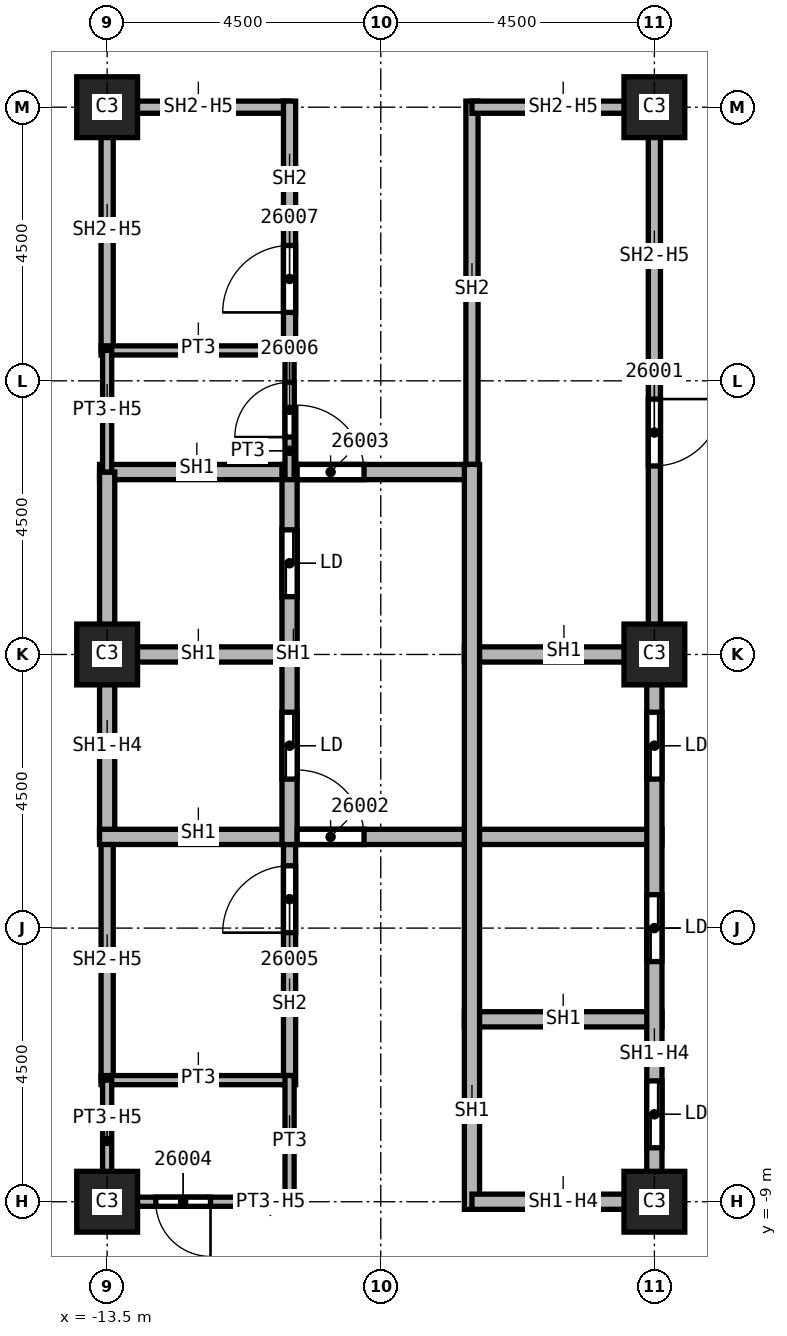
"""IFC4 building model, lengths in metres.
Left out: names, types, materials, properties, quantities, classifications, styles, units other than length and angle.
Written with IfcOpenShell. Run it as: python <this file> out.ifc"""

import sys

from ifc_helpers import new_model, si_unit, direction, frame, frame_2d, origin, origin_2d, place, context, subcontext, project, spatial, rectangle, extrude, element, fill, save


model = new_model("IFC4")
c1 = context("Model", 3, precision=1e-05, world=origin(), true_north=direction((0.0, 1.0)))
c2 = subcontext(c1, "Body", "Model", "MODEL_VIEW")
j1 = project(units=[si_unit("LENGTHUNIT", "METRE"), si_unit("PLANEANGLEUNIT", "RADIAN")], contexts=[c1])
p1 = place(None, origin())
s1 = spatial("IfcSite", under=j1, at=p1, CompositionType="ELEMENT")
p2 = place(p1, origin())
s2 = spatial("IfcBuilding", under=s1, at=p2, CompositionType="ELEMENT")
p3 = place(p2, frame((0.0, 0.0, 120.0)))
s3 = spatial("IfcBuildingStorey", under=s2, at=p3, CompositionType="ELEMENT", Elevation=120.0)
for number, where, z_axis, x_axis in (
    (1, (-4.5, 0.0, 0.0), (0.0, 0.0, 1.0), (1.0, 0.0, 0.0)),
    (2, (-4.5, 9.0, 0.0), (0.0, 0.0, 1.0), (1.0, 0.0, 0.0)),
    (3, (-4.5, -9.0, 0.0), (0.0, 0.0, 1.0), (1.0, 0.0, 0.0)),
    (4, (-13.5, 0.0, 0.0), (0.0, 0.0, 1.0), (1.0, 0.0, 0.0)),
    (5, (-13.5, 9.0, 0.0), (0.0, 0.0, 1.0), (1.0, 0.0, 0.0)),
    (6, (-13.5, -9.0, 0.0), (0.0, 0.0, 1.0), (1.0, 0.0, 0.0)),
):
    element("IfcColumn", number, at=place(p3, frame(where, z_axis=z_axis, x_axis=x_axis)), inside=s3, PredefinedType="COLUMN", context=c2, shape_type="SweptSolid", body=[
        extrude(rectangle(XDim=1.0, YDim=1.0, at=origin_2d()), origin(), (0.0, 0.0, 1.0), 5.7),
    ])
p4 = place(p3, frame((-13.5, -7.0, 0.0), z_axis=(0.0, 0.0, 1.0), x_axis=(0.0, 1.0, 0.0)))
e7 = element("IfcWall", 7, at=p4, inside=s3, PredefinedType="SOLIDWALL", context=c2, shape_type="SweptSolid", body=[
    extrude(rectangle(XDim=4.0, YDim=0.2, at=frame_2d((2.0, 0.0))), origin(), (0.0, 0.0, 1.0), 4.938),
])
p5 = place(p3, frame((-13.5, 5.0, 0.0), z_axis=(0.0, 0.0, 1.0), x_axis=(0.0, 1.0, 0.0)))
e8 = element("IfcWall", 8, at=p5, inside=s3, PredefinedType="SOLIDWALL", context=c2, shape_type="SweptSolid", body=[
    extrude(rectangle(XDim=4.1, YDim=0.2, at=frame_2d((2.05, 0.0))), origin(), (0.0, 0.0, 1.0), 4.938),
])
p6 = place(p3, frame((-13.5, 9.0, 0.0), z_axis=(0.0, 0.0, 1.0), x_axis=(1.0, 0.0, 0.0)))
e9 = element("IfcWall", 9, at=p6, inside=s3, PredefinedType="SOLIDWALL", context=c2, shape_type="SweptSolid", body=[
    extrude(rectangle(XDim=3.0, YDim=0.2, at=frame_2d((1.5, 0.0))), origin(), (0.0, 0.0, 1.0), 4.938),
])
p7 = place(p3, frame((-10.5, -7.075, 0.0), z_axis=(0.0, 0.0, 1.0), x_axis=(0.0, 1.0, 0.0)))
e10 = element("IfcWall", 10, at=p7, inside=s3, PredefinedType="SOLIDWALL", context=c2, shape_type="SweptSolid", body=[
    extrude(rectangle(XDim=4.2, YDim=0.2, at=frame_2d((2.1, 0.0))), origin(), (0.0, 0.0, 1.0), 5.7),
])
p8 = place(p7, frame((2.5, 0.0, 0.0)))
e11 = element("IfcOpeningElement", 11, at=p8, cuts=e10, PredefinedType="OPENING", context=c2, shape_type="SweptSolid", body=[
    extrude(rectangle(XDim=1.1, YDim=2.1, at=frame_2d((0.55, 1.05))), frame((0.0, 0.1, 0.0), z_axis=(0.0, -1.0, 0.0), x_axis=(1.0, 0.0, 0.0)), (0.0, 0.0, 1.0), 0.2),
])
p9 = place(p3, frame((-10.5, 4.925, 0.0), z_axis=(0.0, 0.0, 1.0), x_axis=(0.0, 1.0, 0.0)))
e12 = element("IfcWall", 12, at=p9, inside=s3, PredefinedType="SOLIDWALL", context=c2, shape_type="SweptSolid", body=[
    extrude(rectangle(XDim=4.175, YDim=0.2, at=frame_2d((2.087, 0.0))), origin(), (0.0, 0.0, 1.0), 5.7),
])
p10 = place(p9, frame((0.7, 0.0, 0.0)))
e13 = element("IfcOpeningElement", 13, at=p10, cuts=e12, PredefinedType="OPENING", context=c2, shape_type="SweptSolid", body=[
    extrude(rectangle(XDim=1.1, YDim=2.1, at=frame_2d((0.55, 1.05))), frame((0.0, 0.1, 0.0), z_axis=(0.0, -1.0, 0.0), x_axis=(1.0, 0.0, 0.0)), (0.0, 0.0, 1.0), 0.2),
])
p11 = place(p3, frame((-7.5, 2.875, 0.0), z_axis=(0.0, 0.0, 1.0), x_axis=(0.0, 1.0, 0.0)))
e14 = element("IfcWall", 14, at=p11, inside=s3, PredefinedType="SOLIDWALL", context=c2, shape_type="SweptSolid", body=[
    extrude(rectangle(XDim=6.225, YDim=0.2, at=frame_2d((3.113, 0.0))), origin(), (0.0, 0.0, 1.0), 5.7),
])
p12 = place(p3, frame((-7.5, 9.0, 0.0), z_axis=(0.0, 0.0, 1.0), x_axis=(1.0, 0.0, 0.0)))
e15 = element("IfcWall", 15, at=p12, inside=s3, PredefinedType="SOLIDWALL", context=c2, shape_type="SweptSolid", body=[
    extrude(rectangle(XDim=3.0, YDim=0.2, at=frame_2d((1.5, 0.0))), origin(), (0.0, 0.0, 1.0), 4.938),
])
p13 = place(p3, frame((-4.5, 9.1, 0.0), z_axis=(0.0, 0.0, 1.0), x_axis=(0.0, -1.0, 0.0)))
e16 = element("IfcWall", 16, at=p13, inside=s3, PredefinedType="SOLIDWALL", context=c2, shape_type="SweptSolid", body=[
    extrude(rectangle(XDim=9.1, YDim=0.2, at=frame_2d((4.55, 0.0))), origin(), (0.0, 0.0, 1.0), 4.938),
])
p14 = place(p13, frame((4.9, 0.0, 0.0)))
e17 = element("IfcOpeningElement", 17, at=p14, cuts=e16, PredefinedType="OPENING", context=c2, shape_type="SweptSolid", body=[
    extrude(rectangle(XDim=1.1, YDim=2.1, at=frame_2d((0.55, 1.05))), frame((0.0, 0.1, 0.0), z_axis=(0.0, -1.0, 0.0), x_axis=(1.0, 0.0, 0.0)), (0.0, 0.0, 1.0), 0.2),
])
p15 = place(p3, frame((-13.625, 0.0, 0.0), z_axis=(0.0, 0.0, 1.0), x_axis=(1.0, 0.0, 0.0)))
e18 = element("IfcWall", 18, at=p15, inside=s3, PredefinedType="SOLIDWALL", context=c2, shape_type="SweptSolid", body=[
    extrude(rectangle(XDim=3.125, YDim=0.25, at=frame_2d((1.562, 0.0))), origin(), (0.0, 0.0, 1.0), 5.7),
])
p16 = place(p3, frame((-13.625, 3.0, 0.0), z_axis=(0.0, 0.0, 1.0), x_axis=(1.0, 0.0, 0.0)))
e19 = element("IfcWall", 19, at=p16, inside=s3, PredefinedType="SOLIDWALL", context=c2, shape_type="SweptSolid", body=[
    extrude(rectangle(XDim=6.125, YDim=0.25, at=frame_2d((3.062, 0.0))), origin(), (0.0, 0.0, 1.0), 5.7),
])
p17 = place(p16, frame((3.25, 0.0, 0.0)))
e20 = element("IfcOpeningElement", 20, at=p17, cuts=e19, PredefinedType="OPENING", context=c2, shape_type="SweptSolid", body=[
    extrude(rectangle(XDim=1.1, YDim=2.1, at=frame_2d((0.55, 1.05))), frame((0.0, 0.125, 0.0), z_axis=(0.0, -1.0, 0.0), x_axis=(1.0, 0.0, 0.0)), (0.0, 0.0, 1.0), 0.25),
])
p18 = place(p3, frame((-13.5, -3.0, 0.0), z_axis=(0.0, 0.0, 1.0), x_axis=(0.0, 1.0, 0.0)))
e21 = element("IfcWall", 21, at=p18, inside=s3, PredefinedType="SOLIDWALL", context=c2, shape_type="SweptSolid", body=[
    extrude(rectangle(XDim=6.0, YDim=0.25, at=frame_2d((3.0, 0.0))), origin(), (0.0, 0.0, 1.0), 4.938),
])
p19 = place(p3, frame((-13.625, -3.0, 0.0), z_axis=(0.0, 0.0, 1.0), x_axis=(1.0, 0.0, 0.0)))
e22 = element("IfcWall", 22, at=p19, inside=s3, PredefinedType="SOLIDWALL", context=c2, shape_type="SweptSolid", body=[
    extrude(rectangle(XDim=9.25, YDim=0.25, at=frame_2d((4.625, 0.0))), origin(), (0.0, 0.0, 1.0), 5.7),
])
p20 = place(p19, frame((3.25, 0.0, 0.0)))
e23 = element("IfcOpeningElement", 23, at=p20, cuts=e22, PredefinedType="OPENING", context=c2, shape_type="SweptSolid", body=[
    extrude(rectangle(XDim=1.1, YDim=2.1, at=frame_2d((0.55, 1.05))), frame((0.0, 0.125, 0.0), z_axis=(0.0, -1.0, 0.0), x_axis=(1.0, 0.0, 0.0)), (0.0, 0.0, 1.0), 0.25),
])
p21 = place(p3, frame((-10.5, -3.125, 0.0), z_axis=(0.0, 0.0, 1.0), x_axis=(0.0, 1.0, 0.0)))
e24 = element("IfcWall", 24, at=p21, inside=s3, PredefinedType="SOLIDWALL", context=c2, shape_type="SweptSolid", body=[
    extrude(rectangle(XDim=6.25, YDim=0.25, at=frame_2d((3.125, 0.0))), origin(), (0.0, 0.0, 1.0), 5.7),
])
p22 = place(p21, frame((1.075, 0.0, 0.0)))
e25 = element("IfcOpeningElement", 25, at=p22, cuts=e24, PredefinedType="OPENING", context=c2, shape_type="SweptSolid", body=[
    extrude(rectangle(XDim=1.1, YDim=2.1, at=frame_2d((0.55, 1.05))), frame((0.0, 0.125, 0.0), z_axis=(0.0, -1.0, 0.0), x_axis=(1.0, 0.0, 0.0)), (0.0, 0.0, 1.0), 0.25),
])
p23 = place(p21, frame((4.075, 0.0, 0.0)))
e26 = element("IfcOpeningElement", 26, at=p23, cuts=e24, PredefinedType="OPENING", context=c2, shape_type="SweptSolid", body=[
    extrude(rectangle(XDim=1.1, YDim=2.1, at=frame_2d((0.55, 1.05))), frame((0.0, 0.125, 0.0), z_axis=(0.0, -1.0, 0.0), x_axis=(1.0, 0.0, 0.0)), (0.0, 0.0, 1.0), 0.25),
])
for number, where, z_axis, x_axis in (
    (27, (-7.625, -6.0, 0.0), (0.0, 0.0, 1.0), (1.0, 0.0, 0.0)),
    (28, (-7.625, 0.0, 0.0), (0.0, 0.0, 1.0), (1.0, 0.0, 0.0)),
):
    element("IfcWall", number, at=place(p3, frame(where, z_axis=z_axis, x_axis=x_axis)), inside=s3, PredefinedType="SOLIDWALL", context=c2, shape_type="SweptSolid", body=[
        extrude(rectangle(XDim=3.25, YDim=0.25, at=frame_2d((1.625, 0.0))), origin(), (0.0, 0.0, 1.0), 5.7),
    ])
p24 = place(p3, frame((-7.5, -9.125, 0.0), z_axis=(0.0, 0.0, 1.0), x_axis=(0.0, 1.0, 0.0)))
e29 = element("IfcWall", 29, at=p24, inside=s3, PredefinedType="SOLIDWALL", context=c2, shape_type="SweptSolid", body=[
    extrude(rectangle(XDim=12.25, YDim=0.25, at=frame_2d((6.125, 0.0))), origin(), (0.0, 0.0, 1.0), 5.7),
])
p25 = place(p3, frame((-4.5, -9.0, 0.0), z_axis=(0.0, 0.0, 1.0), x_axis=(-1.0, 0.0, 0.0)))
e30 = element("IfcWall", 30, at=p25, inside=s3, PredefinedType="SOLIDWALL", context=c2, shape_type="SweptSolid", body=[
    extrude(rectangle(XDim=3.0, YDim=0.25, at=frame_2d((1.5, 0.0))), origin(), (0.0, 0.0, 1.0), 4.938),
])
p26 = place(p3, frame((-4.5, 0.0, 0.0), z_axis=(0.0, 0.0, 1.0), x_axis=(0.0, -1.0, 0.0)))
e31 = element("IfcWall", 31, at=p26, inside=s3, PredefinedType="SOLIDWALL", context=c2, shape_type="SweptSolid", body=[
    extrude(rectangle(XDim=9.125, YDim=0.25, at=frame_2d((4.562, 0.0))), origin(), (0.0, 0.0, 1.0), 4.938),
])
p27 = place(p26, frame((7.012, 0.0, 0.0)))
e32 = element("IfcOpeningElement", 32, at=p27, cuts=e31, PredefinedType="OPENING", context=c2, shape_type="SweptSolid", body=[
    extrude(rectangle(XDim=1.1, YDim=2.1, at=frame_2d((0.55, 1.05))), frame((0.0, 0.125, 0.0), z_axis=(0.0, -1.0, 0.0), x_axis=(1.0, 0.0, 0.0)), (0.0, 0.0, 1.0), 0.25),
])
p28 = place(p26, frame((3.95, 0.0, 0.0)))
e33 = element("IfcOpeningElement", 33, at=p28, cuts=e31, PredefinedType="OPENING", context=c2, shape_type="SweptSolid", body=[
    extrude(rectangle(XDim=1.1, YDim=2.1, at=frame_2d((0.55, 1.05))), frame((0.0, 0.125, 0.0), z_axis=(0.0, -1.0, 0.0), x_axis=(1.0, 0.0, 0.0)), (0.0, 0.0, 1.0), 0.25),
])
p29 = place(p26, frame((0.95, 0.0, 0.0)))
e34 = element("IfcOpeningElement", 34, at=p29, cuts=e31, PredefinedType="OPENING", context=c2, shape_type="SweptSolid", body=[
    extrude(rectangle(XDim=1.1, YDim=2.1, at=frame_2d((0.55, 1.05))), frame((0.0, 0.125, 0.0), z_axis=(0.0, -1.0, 0.0), x_axis=(1.0, 0.0, 0.0)), (0.0, 0.0, 1.0), 0.25),
])
for number, where, z_axis, x_axis in (
    (35, (-13.6, -7.0, 0.0), (0.0, 0.0, 1.0), (1.0, 0.0, 0.0)),
    (36, (-13.6, 5.0, 0.0), (0.0, 0.0, 1.0), (1.0, 0.0, 0.0)),
):
    element("IfcWall", number, at=place(p3, frame(where, z_axis=z_axis, x_axis=x_axis)), inside=s3, PredefinedType="PARTITIONING", context=c2, shape_type="SweptSolid", body=[
        extrude(rectangle(XDim=3.1, YDim=0.15, at=frame_2d((1.55, 0.0))), origin(), (0.0, 0.0, 1.0), 5.7),
    ])
p30 = place(p3, frame((-13.5, -9.075, 0.0), z_axis=(0.0, 0.0, 1.0), x_axis=(0.0, 1.0, 0.0)))
e37 = element("IfcWall", 37, at=p30, inside=s3, PredefinedType="PARTITIONING", context=c2, shape_type="SweptSolid", body=[
    extrude(rectangle(XDim=2.075, YDim=0.15, at=frame_2d((1.038, 0.0))), origin(), (0.0, 0.0, 1.0), 4.938),
])
p31 = place(p3, frame((-13.5, 3.0, 0.0), z_axis=(0.0, 0.0, 1.0), x_axis=(0.0, 1.0, 0.0)))
e38 = element("IfcWall", 38, at=p31, inside=s3, PredefinedType="PARTITIONING", context=c2, shape_type="SweptSolid", body=[
    extrude(rectangle(XDim=2.0, YDim=0.15, at=frame_2d((1.0, 0.0))), origin(), (0.0, 0.0, 1.0), 4.938),
])
p32 = place(p3, frame((-10.5, -9.075, 0.0), z_axis=(0.0, 0.0, 1.0), x_axis=(0.0, 1.0, 0.0)))
e39 = element("IfcWall", 39, at=p32, inside=s3, PredefinedType="PARTITIONING", context=c2, shape_type="SweptSolid", body=[
    extrude(rectangle(XDim=2.15, YDim=0.15, at=frame_2d((1.075, 0.0))), origin(), (0.0, 0.0, 1.0), 5.7),
])
p33 = place(p3, frame((-10.5, -9.0, 0.0), z_axis=(0.0, 0.0, 1.0), x_axis=(-1.0, 0.0, 0.0)))
e40 = element("IfcWall", 40, at=p33, inside=s3, PredefinedType="PARTITIONING", context=c2, shape_type="SweptSolid", body=[
    extrude(rectangle(XDim=3.0, YDim=0.15, at=frame_2d((1.5, 0.0))), origin(), (0.0, 0.0, 1.0), 4.938),
])
p34 = place(p33, frame((1.3, 0.0, 0.0)))
e41 = element("IfcOpeningElement", 41, at=p34, cuts=e40, PredefinedType="OPENING", context=c2, shape_type="SweptSolid", body=[
    extrude(rectangle(XDim=0.9, YDim=2.1, at=frame_2d((0.45, 1.05))), frame((0.0, 0.075, 0.0), z_axis=(0.0, -1.0, 0.0), x_axis=(1.0, 0.0, 0.0)), (0.0, 0.0, 1.0), 0.15),
])
p35 = place(p3, frame((-10.5, 2.875, 0.0), z_axis=(0.0, 0.0, 1.0), x_axis=(0.0, 1.0, 0.0)))
e42 = element("IfcWall", 42, at=p35, inside=s3, PredefinedType="PARTITIONING", context=c2, shape_type="SweptSolid", body=[
    extrude(rectangle(XDim=2.2, YDim=0.15, at=frame_2d((1.1, 0.0))), origin(), (0.0, 0.0, 1.0), 5.7),
])
p36 = place(p35, frame((0.7, 0.0, 0.0)))
e43 = element("IfcOpeningElement", 43, at=p36, cuts=e42, PredefinedType="OPENING", context=c2, shape_type="SweptSolid", body=[
    extrude(rectangle(XDim=0.9, YDim=2.1, at=frame_2d((0.45, 1.05))), frame((0.0, 0.075, 0.0), z_axis=(0.0, -1.0, 0.0), x_axis=(1.0, 0.0, 0.0)), (0.0, 0.0, 1.0), 0.15),
])
p37 = place(p14, origin())
e44 = element("IfcDoor", 44, at=p37, inside=s3, OperationType="SINGLE_SWING_RIGHT", PredefinedType="DOOR", context=c2, shape_type="SweptSolid", body=[
    extrude(rectangle(XDim=1.1, YDim=2.1, at=frame_2d((0.55, 1.05))), frame((0.0, 0.025, 0.0), z_axis=(0.0, -1.0, 0.0), x_axis=(1.0, 0.0, 0.0)), (0.0, 0.0, 1.0), 0.05),
])
fill(e17, e44)
p38 = place(p20, origin())
e45 = element("IfcDoor", 45, at=p38, inside=s3, OperationType="SINGLE_SWING_LEFT", PredefinedType="DOOR", context=c2, shape_type="SweptSolid", body=[
    extrude(rectangle(XDim=1.1, YDim=2.1, at=frame_2d((0.55, 1.05))), frame((0.0, 0.025, 0.0), z_axis=(0.0, -1.0, 0.0), x_axis=(1.0, 0.0, 0.0)), (0.0, 0.0, 1.0), 0.05),
])
fill(e23, e45)
p39 = place(p17, origin())
e46 = element("IfcDoor", 46, at=p39, inside=s3, OperationType="SINGLE_SWING_RIGHT", PredefinedType="DOOR", context=c2, shape_type="SweptSolid", body=[
    extrude(rectangle(XDim=1.1, YDim=2.1, at=frame_2d((0.55, 1.05))), frame((0.0, 0.025, 0.0), z_axis=(0.0, -1.0, 0.0), x_axis=(1.0, 0.0, 0.0)), (0.0, 0.0, 1.0), 0.05),
])
fill(e20, e46)
p40 = place(p34, origin())
e47 = element("IfcDoor", 47, at=p40, inside=s3, OperationType="SINGLE_SWING_LEFT", PredefinedType="DOOR", context=c2, shape_type="SweptSolid", body=[
    extrude(rectangle(XDim=0.9, YDim=2.1, at=frame_2d((0.45, 1.05))), frame((0.0, 0.025, 0.0), z_axis=(0.0, -1.0, 0.0), x_axis=(1.0, 0.0, 0.0)), (0.0, 0.0, 1.0), 0.05),
])
fill(e41, e47)
p41 = place(p8, origin())
e48 = element("IfcDoor", 48, at=p41, inside=s3, OperationType="SINGLE_SWING_RIGHT", PredefinedType="DOOR", context=c2, shape_type="SweptSolid", body=[
    extrude(rectangle(XDim=1.1, YDim=2.1, at=frame_2d((0.55, 1.05))), frame((0.0, 0.025, 0.0), z_axis=(0.0, -1.0, 0.0), x_axis=(1.0, 0.0, 0.0)), (0.0, 0.0, 1.0), 0.05),
])
fill(e11, e48)
p42 = place(p36, origin())
e49 = element("IfcDoor", 49, at=p42, inside=s3, OperationType="SINGLE_SWING_LEFT", PredefinedType="DOOR", context=c2, shape_type="SweptSolid", body=[
    extrude(rectangle(XDim=0.9, YDim=2.1, at=frame_2d((0.45, 1.05))), frame((0.0, 0.025, 0.0), z_axis=(0.0, -1.0, 0.0), x_axis=(1.0, 0.0, 0.0)), (0.0, 0.0, 1.0), 0.05),
])
fill(e43, e49)
p43 = place(p10, origin())
e50 = element("IfcDoor", 50, at=p43, inside=s3, OperationType="SINGLE_SWING_RIGHT", PredefinedType="DOOR", context=c2, shape_type="SweptSolid", body=[
    extrude(rectangle(XDim=1.1, YDim=2.1, at=frame_2d((0.55, 1.05))), frame((0.0, 0.025, 0.0), z_axis=(0.0, -1.0, 0.0), x_axis=(1.0, 0.0, 0.0)), (0.0, 0.0, 1.0), 0.05),
])
fill(e13, e50)
p44 = place(p27, origin())
e51 = element("IfcDoor", 51, at=p44, inside=s3, OperationType="SLIDING_TO_LEFT", PredefinedType="DOOR", context=c2, shape_type="SweptSolid", body=[
    extrude(rectangle(XDim=1.1, YDim=2.1, at=frame_2d((0.55, 1.05))), frame((0.0, 0.025, 0.0), z_axis=(0.0, -1.0, 0.0), x_axis=(1.0, 0.0, 0.0)), (0.0, 0.0, 1.0), 0.05),
])
fill(e32, e51)
p45 = place(p28, origin())
e52 = element("IfcDoor", 52, at=p45, inside=s3, OperationType="SLIDING_TO_LEFT", PredefinedType="DOOR", context=c2, shape_type="SweptSolid", body=[
    extrude(rectangle(XDim=1.1, YDim=2.1, at=frame_2d((0.55, 1.05))), frame((0.0, 0.025, 0.0), z_axis=(0.0, -1.0, 0.0), x_axis=(1.0, 0.0, 0.0)), (0.0, 0.0, 1.0), 0.05),
])
fill(e33, e52)
p46 = place(p29, origin())
e53 = element("IfcDoor", 53, at=p46, inside=s3, OperationType="SLIDING_TO_LEFT", PredefinedType="DOOR", context=c2, shape_type="SweptSolid", body=[
    extrude(rectangle(XDim=1.1, YDim=2.1, at=frame_2d((0.55, 1.05))), frame((0.0, 0.025, 0.0), z_axis=(0.0, -1.0, 0.0), x_axis=(1.0, 0.0, 0.0)), (0.0, 0.0, 1.0), 0.05),
])
fill(e34, e53)
p47 = place(p22, origin())
e54 = element("IfcDoor", 54, at=p47, inside=s3, OperationType="SLIDING_TO_LEFT", PredefinedType="DOOR", context=c2, shape_type="SweptSolid", body=[
    extrude(rectangle(XDim=1.1, YDim=2.1, at=frame_2d((0.55, 1.05))), frame((0.0, 0.025, 0.0), z_axis=(0.0, -1.0, 0.0), x_axis=(1.0, 0.0, 0.0)), (0.0, 0.0, 1.0), 0.05),
])
fill(e25, e54)
p48 = place(p23, origin())
e55 = element("IfcDoor", 55, at=p48, inside=s3, OperationType="SLIDING_TO_LEFT", PredefinedType="DOOR", context=c2, shape_type="SweptSolid", body=[
    extrude(rectangle(XDim=1.1, YDim=2.1, at=frame_2d((0.55, 1.05))), frame((0.0, 0.025, 0.0), z_axis=(0.0, -1.0, 0.0), x_axis=(1.0, 0.0, 0.0)), (0.0, 0.0, 1.0), 0.05),
])
fill(e26, e55)
save(model, sys.argv[1])
